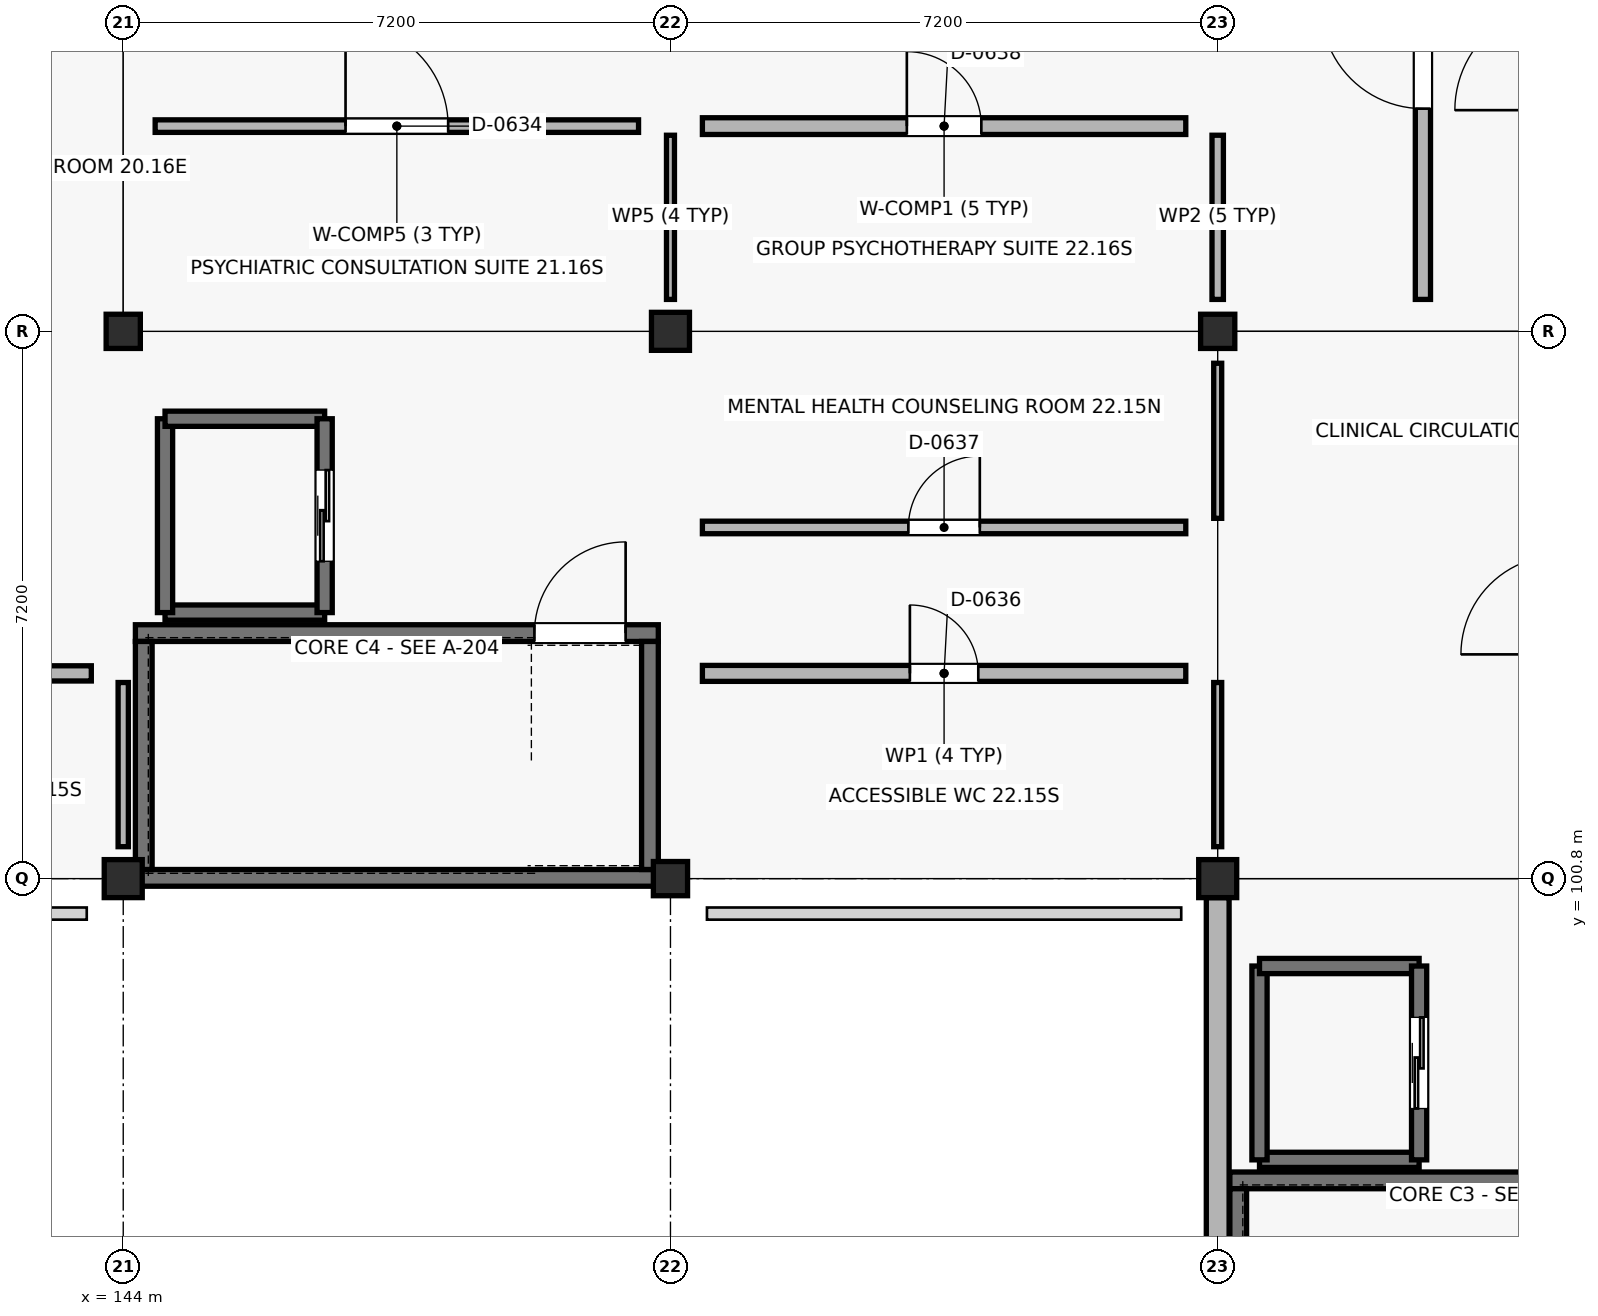
"""IFC4 building model, lengths in metres.
Left out: names, types, materials, properties, quantities, classifications, styles, units other than length and angle.
Written with IfcOpenShell. Run it as: python <this file> out.ifc"""

import sys

from ifc_helpers import new_model, si_unit, direction, frame, frame_2d, origin, origin_2d, place, context, subcontext, project, spatial, rectangle, extrude, element, fill, save


model = new_model("IFC4")
c1 = context("Model", 3, precision=1e-05, world=origin(), true_north=direction((0.0, 1.0)))
c2 = subcontext(c1, "Body", "Model", "MODEL_VIEW")
j1 = project(units=[si_unit("LENGTHUNIT", "METRE"), si_unit("PLANEANGLEUNIT", "RADIAN")], contexts=[c1])
p1 = place(None, origin())
s1 = spatial("IfcSite", under=j1, at=p1, CompositionType="ELEMENT")
p2 = place(p1, origin())
s2 = spatial("IfcBuilding", under=s1, at=p2, CompositionType="ELEMENT")
p3 = place(p2, frame((0.0, 0.0, 17.55)))
s3 = spatial("IfcBuildingStorey", under=s2, at=p3, CompositionType="ELEMENT", Elevation=17.55)
p4 = place(p3, frame((144.0, 100.8, 0.0), z_axis=(0.0, 0.0, 1.0), x_axis=(1.0, 0.0, 0.0)))
e1 = element("IfcColumn", 1, at=p4, inside=s3, PredefinedType="COLUMN", context=c2, shape_type="SweptSolid", body=[
    extrude(rectangle(XDim=0.5, YDim=0.5, at=origin_2d()), origin(), (0.0, 0.0, 1.0), 3.83),
])
for number, where, z_axis, x_axis in (
    (2, (144.0, 108.0, 0.0), (0.0, 0.0, 1.0), (1.0, 0.0, 0.0)),
    (3, (151.2, 100.8, 0.0), (0.0, 0.0, 1.0), (1.0, 0.0, 0.0)),
):
    element("IfcColumn", number, at=place(p3, frame(where, z_axis=z_axis, x_axis=x_axis)), inside=s3, PredefinedType="COLUMN", context=c2, shape_type="SweptSolid", body=[
        extrude(rectangle(XDim=0.45, YDim=0.45, at=origin_2d()), origin(), (0.0, 0.0, 1.0), 3.83),
    ])
for number, where, z_axis, x_axis in (
    (4, (151.2, 108.0, 0.0), (0.0, 0.0, 1.0), (1.0, 0.0, 0.0)),
    (5, (158.4, 100.8, 0.0), (0.0, 0.0, 1.0), (1.0, 0.0, 0.0)),
):
    element("IfcColumn", number, at=place(p3, frame(where, z_axis=z_axis, x_axis=x_axis)), inside=s3, PredefinedType="COLUMN", context=c2, shape_type="SweptSolid", body=[
        extrude(rectangle(XDim=0.5, YDim=0.5, at=origin_2d()), origin(), (0.0, 0.0, 1.0), 3.83),
    ])
p5 = place(p3, frame((158.4, 108.0, 0.0), z_axis=(0.0, 0.0, 1.0), x_axis=(1.0, 0.0, 0.0)))
e6 = element("IfcColumn", 6, at=p5, inside=s3, PredefinedType="COLUMN", context=c2, shape_type="SweptSolid", body=[
    extrude(rectangle(XDim=0.45, YDim=0.45, at=origin_2d()), origin(), (0.0, 0.0, 1.0), 3.83),
])
p6 = place(p3, frame((158.4, 100.55, 0.0), z_axis=(0.0, 0.0, 1.0), x_axis=(0.0, -1.0, 0.0)))
e7 = element("IfcWall", 7, at=p6, inside=s3, PredefinedType="STANDARD", context=c2, shape_type="SweptSolid", body=[
    extrude(rectangle(XDim=6.725, YDim=0.3, at=frame_2d((3.363, 0.0))), origin(), (0.0, 0.0, 1.0), 3.25),
])
p7 = place(p3, frame((158.56, 96.83, 0.0), z_axis=(0.0, 0.0, 1.0), x_axis=(1.0, 0.0, 0.0)))
e8 = element("IfcWall", 8, at=p7, inside=s3, PredefinedType="SHEAR", context=c2, shape_type="SweptSolid", body=[
    extrude(rectangle(XDim=6.88, YDim=0.22, at=frame_2d((3.44, 0.0))), origin(), (0.0, 0.0, 1.0), 3.8),
])
p8 = place(p7, frame((5.25, 0.0, 0.0)))
e9 = element("IfcOpeningElement", 9, at=p8, cuts=e8, PredefinedType="OPENING", context=c2, shape_type="SweptSolid", body=[
    extrude(rectangle(XDim=1.2, YDim=2.15, at=frame_2d((0.6, 1.075))), frame((0.0, 0.12, 0.0), z_axis=(0.0, -1.0, 0.0), x_axis=(1.0, 0.0, 0.0)), (0.0, 0.0, 1.0), 0.24),
])
p9 = place(p3, frame((158.67, 93.72, 0.0), z_axis=(0.0, 0.0, 1.0), x_axis=(0.0, 1.0, 0.0)))
e10 = element("IfcWall", 10, at=p9, inside=s3, PredefinedType="SHEAR", context=c2, shape_type="SweptSolid", body=[
    extrude(rectangle(XDim=3.0, YDim=0.22, at=frame_2d((1.5, 0.0))), origin(), (0.0, 0.0, 1.0), 3.8),
])
p10 = place(p3, frame((158.95, 97.1, 0.0), z_axis=(0.0, 0.0, 1.0), x_axis=(1.0, 0.0, 0.0)))
e11 = element("IfcWall", 11, at=p10, inside=s3, PredefinedType="SHEAR", context=c2, shape_type="SweptSolid", body=[
    extrude(rectangle(XDim=2.1, YDim=0.2, at=frame_2d((1.05, 0.0))), origin(), (0.0, 0.0, 1.0), 4.05),
])
p11 = place(p3, frame((158.95, 97.1, 0.0), z_axis=(0.0, 0.0, 1.0), x_axis=(0.0, 1.0, 0.0)))
e12 = element("IfcWall", 12, at=p11, inside=s3, PredefinedType="SHEAR", context=c2, shape_type="SweptSolid", body=[
    extrude(rectangle(XDim=2.55, YDim=0.2, at=frame_2d((1.275, 0.0))), origin(), (0.0, 0.0, 1.0), 4.05),
])
p12 = place(p3, frame((158.95, 99.65, 0.0), z_axis=(0.0, 0.0, 1.0), x_axis=(1.0, 0.0, 0.0)))
e13 = element("IfcWall", 13, at=p12, inside=s3, PredefinedType="SHEAR", context=c2, shape_type="SweptSolid", body=[
    extrude(rectangle(XDim=2.1, YDim=0.2, at=frame_2d((1.05, 0.0))), origin(), (0.0, 0.0, 1.0), 4.05),
])
p13 = place(p3, frame((161.05, 97.1, 0.0), z_axis=(0.0, 0.0, 1.0), x_axis=(0.0, 1.0, 0.0)))
e14 = element("IfcWall", 14, at=p13, inside=s3, PredefinedType="SHEAR", context=c2, shape_type="SweptSolid", body=[
    extrude(rectangle(XDim=2.55, YDim=0.2, at=frame_2d((1.275, 0.0))), origin(), (0.0, 0.0, 1.0), 4.05),
])
p14 = place(p13, frame((0.675, 0.0, 0.0)))
e15 = element("IfcOpeningElement", 15, at=p14, cuts=e14, PredefinedType="OPENING", context=c2, shape_type="SweptSolid", body=[
    extrude(rectangle(XDim=1.2, YDim=2.15, at=frame_2d((0.6, 1.075))), frame((0.0, 0.11, 0.0), z_axis=(0.0, -1.0, 0.0), x_axis=(1.0, 0.0, 0.0)), (0.0, 0.0, 1.0), 0.22),
])
p15 = place(p3, frame((144.16, 100.81, 0.0), z_axis=(0.0, 0.0, 1.0), x_axis=(1.0, 0.0, 0.0)))
e16 = element("IfcWall", 16, at=p15, inside=s3, PredefinedType="SHEAR", context=c2, shape_type="SweptSolid", body=[
    extrude(rectangle(XDim=6.88, YDim=0.22, at=frame_2d((3.44, 0.0))), origin(), (0.0, 0.0, 1.0), 3.8),
])
p16 = place(p3, frame((144.16, 104.03, 0.0), z_axis=(0.0, 0.0, 1.0), x_axis=(1.0, 0.0, 0.0)))
e17 = element("IfcWall", 17, at=p16, inside=s3, PredefinedType="SHEAR", context=c2, shape_type="SweptSolid", body=[
    extrude(rectangle(XDim=6.88, YDim=0.22, at=frame_2d((3.44, 0.0))), origin(), (0.0, 0.0, 1.0), 3.8),
])
p17 = place(p16, frame((5.25, 0.0, 0.0)))
e18 = element("IfcOpeningElement", 18, at=p17, cuts=e17, PredefinedType="OPENING", context=c2, shape_type="SweptSolid", body=[
    extrude(rectangle(XDim=1.2, YDim=2.15, at=frame_2d((0.6, 1.075))), frame((0.0, 0.12, 0.0), z_axis=(0.0, -1.0, 0.0), x_axis=(1.0, 0.0, 0.0)), (0.0, 0.0, 1.0), 0.24),
])
for number, where, z_axis, x_axis in (
    (19, (144.27, 100.92, 0.0), (0.0, 0.0, 1.0), (0.0, 1.0, 0.0)),
    (20, (150.93, 100.92, 0.0), (0.0, 0.0, 1.0), (0.0, 1.0, 0.0)),
):
    element("IfcWall", number, at=place(p3, frame(where, z_axis=z_axis, x_axis=x_axis)), inside=s3, PredefinedType="SHEAR", context=c2, shape_type="SweptSolid", body=[
        extrude(rectangle(XDim=3.0, YDim=0.22, at=frame_2d((1.5, 0.0))), origin(), (0.0, 0.0, 1.0), 3.8),
    ])
p18 = place(p3, frame((144.55, 104.3, 0.0), z_axis=(0.0, 0.0, 1.0), x_axis=(1.0, 0.0, 0.0)))
e21 = element("IfcWall", 21, at=p18, inside=s3, PredefinedType="SHEAR", context=c2, shape_type="SweptSolid", body=[
    extrude(rectangle(XDim=2.1, YDim=0.2, at=frame_2d((1.05, 0.0))), origin(), (0.0, 0.0, 1.0), 4.05),
])
p19 = place(p3, frame((144.55, 104.3, 0.0), z_axis=(0.0, 0.0, 1.0), x_axis=(0.0, 1.0, 0.0)))
e22 = element("IfcWall", 22, at=p19, inside=s3, PredefinedType="SHEAR", context=c2, shape_type="SweptSolid", body=[
    extrude(rectangle(XDim=2.55, YDim=0.2, at=frame_2d((1.275, 0.0))), origin(), (0.0, 0.0, 1.0), 4.05),
])
p20 = place(p3, frame((144.55, 106.85, 0.0), z_axis=(0.0, 0.0, 1.0), x_axis=(1.0, 0.0, 0.0)))
e23 = element("IfcWall", 23, at=p20, inside=s3, PredefinedType="SHEAR", context=c2, shape_type="SweptSolid", body=[
    extrude(rectangle(XDim=2.1, YDim=0.2, at=frame_2d((1.05, 0.0))), origin(), (0.0, 0.0, 1.0), 4.05),
])
p21 = place(p3, frame((146.65, 104.3, 0.0), z_axis=(0.0, 0.0, 1.0), x_axis=(0.0, 1.0, 0.0)))
e24 = element("IfcWall", 24, at=p21, inside=s3, PredefinedType="SHEAR", context=c2, shape_type="SweptSolid", body=[
    extrude(rectangle(XDim=2.55, YDim=0.2, at=frame_2d((1.275, 0.0))), origin(), (0.0, 0.0, 1.0), 4.05),
])
p22 = place(p21, frame((0.675, 0.0, 0.0)))
e25 = element("IfcOpeningElement", 25, at=p22, cuts=e24, PredefinedType="OPENING", context=c2, shape_type="SweptSolid", body=[
    extrude(rectangle(XDim=1.2, YDim=2.15, at=frame_2d((0.6, 1.075))), frame((0.0, 0.11, 0.0), z_axis=(0.0, -1.0, 0.0), x_axis=(1.0, 0.0, 0.0)), (0.0, 0.0, 1.0), 0.22),
])
p23 = place(p3, frame((137.22, 103.5, 0.0), z_axis=(0.0, 0.0, 1.0), x_axis=(1.0, 0.0, 0.0)))
e26 = element("IfcWall", 26, at=p23, inside=s3, PredefinedType="SOLIDWALL", context=c2, shape_type="SweptSolid", body=[
    extrude(rectangle(XDim=6.36, YDim=0.2, at=frame_2d((3.18, 0.0))), origin(), (0.0, 0.0, 1.0), 2.94),
])
p24 = place(p23, frame((2.555, 0.0, 0.0)))
e27 = element("IfcOpeningElement", 27, at=p24, cuts=e26, PredefinedType="OPENING", context=c2, shape_type="SweptSolid", body=[
    extrude(rectangle(XDim=1.25, YDim=2.15, at=frame_2d((0.625, 1.075))), frame((0.0, 0.11, 0.0), z_axis=(0.0, -1.0, 0.0), x_axis=(1.0, 0.0, 0.0)), (0.0, 0.0, 1.0), 0.22),
])
p25 = place(p3, frame((144.0, 101.22, 0.0), z_axis=(0.0, 0.0, 1.0), x_axis=(0.0, 1.0, 0.0)))
e28 = element("IfcWall", 28, at=p25, inside=s3, PredefinedType="PARTITIONING", context=c2, shape_type="SweptSolid", body=[
    extrude(rectangle(XDim=2.16, YDim=0.135, at=frame_2d((1.08, 0.0))), origin(), (0.0, 0.0, 1.0), 2.94),
])
p26 = place(p3, frame((144.42, 110.7, 0.0), z_axis=(0.0, 0.0, 1.0), x_axis=(1.0, 0.0, 0.0)))
e29 = element("IfcWall", 29, at=p26, inside=s3, PredefinedType="PARTITIONING", context=c2, shape_type="SweptSolid", body=[
    extrude(rectangle(XDim=6.36, YDim=0.165, at=frame_2d((3.18, 0.0))), origin(), (0.0, 0.0, 1.0), 2.94),
])
p27 = place(p26, frame((2.505, 0.0, 0.0)))
e30 = element("IfcOpeningElement", 30, at=p27, cuts=e29, PredefinedType="OPENING", context=c2, shape_type="SweptSolid", body=[
    extrude(rectangle(XDim=1.35, YDim=2.2, at=frame_2d((0.675, 1.1))), frame((0.0, 0.093, 0.0), z_axis=(0.0, -1.0, 0.0), x_axis=(1.0, 0.0, 0.0)), (0.0, 0.0, 1.0), 0.185),
])
p28 = place(p3, frame((151.2, 108.42, 0.0), z_axis=(0.0, 0.0, 1.0), x_axis=(0.0, 1.0, 0.0)))
e31 = element("IfcWall", 31, at=p28, inside=s3, PredefinedType="PARTITIONING", context=c2, shape_type="SweptSolid", body=[
    extrude(rectangle(XDim=2.16, YDim=0.105, at=frame_2d((1.08, 0.0))), origin(), (0.0, 0.0, 1.0), 2.94),
])
p29 = place(p3, frame((151.62, 103.5, 0.0), z_axis=(0.0, 0.0, 1.0), x_axis=(1.0, 0.0, 0.0)))
e32 = element("IfcWall", 32, at=p29, inside=s3, PredefinedType="PLUMBINGWALL", context=c2, shape_type="SweptSolid", body=[
    extrude(rectangle(XDim=6.36, YDim=0.21, at=frame_2d((3.18, 0.0))), origin(), (0.0, 0.0, 1.0), 2.94),
])
p30 = place(p29, frame((2.73, 0.0, 0.0)))
e33 = element("IfcOpeningElement", 33, at=p30, cuts=e32, PredefinedType="OPENING", context=c2, shape_type="SweptSolid", body=[
    extrude(rectangle(XDim=0.9, YDim=2.04, at=frame_2d((0.45, 1.02))), frame((0.0, 0.115, 0.0), z_axis=(0.0, -1.0, 0.0), x_axis=(1.0, 0.0, 0.0)), (0.0, 0.0, 1.0), 0.23),
])
p31 = place(p3, frame((158.4, 101.22, 0.0), z_axis=(0.0, 0.0, 1.0), x_axis=(0.0, 1.0, 0.0)))
e34 = element("IfcWall", 34, at=p31, inside=s3, PredefinedType="PARTITIONING", context=c2, shape_type="SweptSolid", body=[
    extrude(rectangle(XDim=2.16, YDim=0.105, at=frame_2d((1.08, 0.0))), origin(), (0.0, 0.0, 1.0), 2.94),
])
p32 = place(p3, frame((151.62, 105.42, 0.0), z_axis=(0.0, 0.0, 1.0), x_axis=(1.0, 0.0, 0.0)))
e35 = element("IfcWall", 35, at=p32, inside=s3, PredefinedType="PARTITIONING", context=c2, shape_type="SweptSolid", body=[
    extrude(rectangle(XDim=6.36, YDim=0.165, at=frame_2d((3.18, 0.0))), origin(), (0.0, 0.0, 1.0), 2.94),
])
p33 = place(p32, frame((2.71, 0.0, 0.0)))
e36 = element("IfcOpeningElement", 36, at=p33, cuts=e35, PredefinedType="OPENING", context=c2, shape_type="SweptSolid", body=[
    extrude(rectangle(XDim=0.94, YDim=2.04, at=frame_2d((0.47, 1.02))), frame((0.0, 0.093, 0.0), z_axis=(0.0, -1.0, 0.0), x_axis=(1.0, 0.0, 0.0)), (0.0, 0.0, 1.0), 0.185),
])
p34 = place(p3, frame((158.4, 105.54, 0.0), z_axis=(0.0, 0.0, 1.0), x_axis=(0.0, 1.0, 0.0)))
e37 = element("IfcWall", 37, at=p34, inside=s3, PredefinedType="PARTITIONING", context=c2, shape_type="SweptSolid", body=[
    extrude(rectangle(XDim=2.04, YDim=0.105, at=frame_2d((1.02, 0.0))), origin(), (0.0, 0.0, 1.0), 2.94),
])
p35 = place(p3, frame((151.62, 110.7, 0.0), z_axis=(0.0, 0.0, 1.0), x_axis=(1.0, 0.0, 0.0)))
e38 = element("IfcWall", 38, at=p35, inside=s3, PredefinedType="SOLIDWALL", context=c2, shape_type="SweptSolid", body=[
    extrude(rectangle(XDim=6.36, YDim=0.22, at=frame_2d((3.18, 0.0))), origin(), (0.0, 0.0, 1.0), 2.94),
])
p36 = place(p35, frame((2.69, 0.0, 0.0)))
e39 = element("IfcOpeningElement", 39, at=p36, cuts=e38, PredefinedType="OPENING", context=c2, shape_type="SweptSolid", body=[
    extrude(rectangle(XDim=0.98, YDim=2.04, at=frame_2d((0.49, 1.02))), frame((0.0, 0.12, 0.0), z_axis=(0.0, -1.0, 0.0), x_axis=(1.0, 0.0, 0.0)), (0.0, 0.0, 1.0), 0.24),
])
p37 = place(p3, frame((158.4, 108.42, 0.0), z_axis=(0.0, 0.0, 1.0), x_axis=(0.0, 1.0, 0.0)))
e40 = element("IfcWall", 40, at=p37, inside=s3, PredefinedType="PARTITIONING", context=c2, shape_type="SweptSolid", body=[
    extrude(rectangle(XDim=2.16, YDim=0.15, at=frame_2d((1.08, 0.0))), origin(), (0.0, 0.0, 1.0), 2.94),
])
p38 = place(p3, frame((161.1, 108.42, 0.0), z_axis=(0.0, 0.0, 1.0), x_axis=(0.0, 1.0, 0.0)))
e41 = element("IfcWall", 41, at=p38, inside=s3, PredefinedType="SOLIDWALL", context=c2, shape_type="SweptSolid", body=[
    extrude(rectangle(XDim=6.36, YDim=0.2, at=frame_2d((3.18, 0.0))), origin(), (0.0, 0.0, 1.0), 2.94),
])
p39 = place(p38, frame((2.51, 0.0, 0.0)))
e42 = element("IfcOpeningElement", 42, at=p39, cuts=e41, PredefinedType="OPENING", context=c2, shape_type="SweptSolid", body=[
    extrude(rectangle(XDim=1.34, YDim=2.04, at=frame_2d((0.67, 1.02))), frame((0.0, 0.11, 0.0), z_axis=(0.0, -1.0, 0.0), x_axis=(1.0, 0.0, 0.0)), (0.0, 0.0, 1.0), 0.22),
])
p40 = place(p14, origin())
e43 = element("IfcDoor", 43, at=p40, inside=s3, OperationType="SLIDING_TO_LEFT", PredefinedType="DOOR", context=c2, shape_type="SweptSolid", body=[
    extrude(rectangle(XDim=1.2, YDim=2.15, at=frame_2d((0.6, 1.075))), frame((0.0, 0.025, 0.0), z_axis=(0.0, -1.0, 0.0), x_axis=(1.0, 0.0, 0.0)), (0.0, 0.0, 1.0), 0.05),
])
fill(e15, e43)
p41 = place(p17, origin())
e44 = element("IfcDoor", 44, at=p41, inside=s3, OperationType="SINGLE_SWING_RIGHT", PredefinedType="DOOR", context=c2, shape_type="SweptSolid", body=[
    extrude(rectangle(XDim=1.2, YDim=2.15, at=frame_2d((0.6, 1.075))), frame((0.0, 0.025, 0.0), z_axis=(0.0, -1.0, 0.0), x_axis=(1.0, 0.0, 0.0)), (0.0, 0.0, 1.0), 0.05),
])
fill(e18, e44)
p42 = place(p22, origin())
e45 = element("IfcDoor", 45, at=p42, inside=s3, OperationType="SLIDING_TO_LEFT", PredefinedType="DOOR", context=c2, shape_type="SweptSolid", body=[
    extrude(rectangle(XDim=1.2, YDim=2.15, at=frame_2d((0.6, 1.075))), frame((0.0, 0.025, 0.0), z_axis=(0.0, -1.0, 0.0), x_axis=(1.0, 0.0, 0.0)), (0.0, 0.0, 1.0), 0.05),
])
fill(e25, e45)
p43 = place(p27, origin())
e46 = element("IfcDoor", 46, at=p43, inside=s3, OperationType="SINGLE_SWING_LEFT", PredefinedType="DOOR", context=c2, shape_type="SweptSolid", body=[
    extrude(rectangle(XDim=1.35, YDim=2.2, at=frame_2d((0.675, 1.1))), frame((0.0, 0.025, 0.0), z_axis=(0.0, -1.0, 0.0), x_axis=(1.0, 0.0, 0.0)), (0.0, 0.0, 1.0), 0.05),
])
fill(e30, e46)
p44 = place(p30, origin())
e47 = element("IfcDoor", 47, at=p44, inside=s3, OperationType="SINGLE_SWING_LEFT", PredefinedType="DOOR", context=c2, shape_type="SweptSolid", body=[
    extrude(rectangle(XDim=0.9, YDim=2.04, at=frame_2d((0.45, 1.02))), frame((0.0, 0.025, 0.0), z_axis=(0.0, -1.0, 0.0), x_axis=(1.0, 0.0, 0.0)), (0.0, 0.0, 1.0), 0.05),
])
fill(e33, e47)
p45 = place(p33, origin())
e48 = element("IfcDoor", 48, at=p45, inside=s3, OperationType="SINGLE_SWING_RIGHT", PredefinedType="DOOR", context=c2, shape_type="SweptSolid", body=[
    extrude(rectangle(XDim=0.94, YDim=2.04, at=frame_2d((0.47, 1.02))), frame((0.0, 0.025, 0.0), z_axis=(0.0, -1.0, 0.0), x_axis=(1.0, 0.0, 0.0)), (0.0, 0.0, 1.0), 0.05),
])
fill(e36, e48)
p46 = place(p36, origin())
e49 = element("IfcDoor", 49, at=p46, inside=s3, OperationType="SINGLE_SWING_LEFT", PredefinedType="DOOR", context=c2, shape_type="SweptSolid", body=[
    extrude(rectangle(XDim=0.98, YDim=2.04, at=frame_2d((0.49, 1.02))), frame((0.0, 0.025, 0.0), z_axis=(0.0, -1.0, 0.0), x_axis=(1.0, 0.0, 0.0)), (0.0, 0.0, 1.0), 0.05),
])
fill(e39, e49)
p47 = place(p39, origin())
e50 = element("IfcDoor", 50, at=p47, inside=s3, OperationType="SINGLE_SWING_RIGHT", PredefinedType="DOOR", context=c2, shape_type="SweptSolid", body=[
    extrude(rectangle(XDim=1.34, YDim=2.04, at=frame_2d((0.67, 1.02))), frame((0.0, 0.025, 0.0), z_axis=(0.0, -1.0, 0.0), x_axis=(1.0, 0.0, 0.0)), (0.0, 0.0, 1.0), 0.05),
])
fill(e42, e50)
save(model, sys.argv[1])
